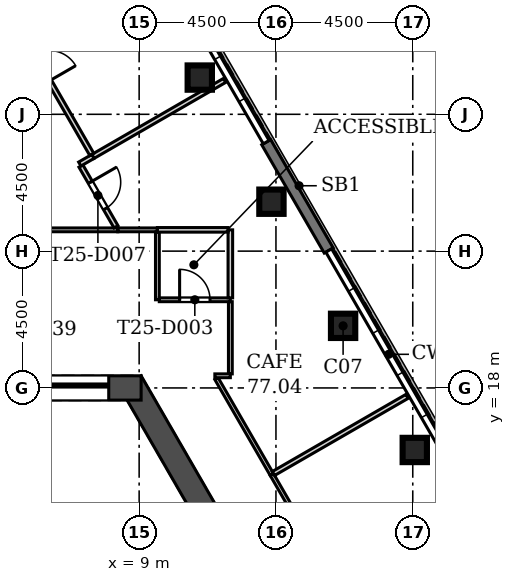
"""IFC4 building model, lengths in metres.
Left out: names, types, materials, properties, quantities, classifications, styles, units other than length and angle.
Written with IfcOpenShell. Run it as: python <this file> out.ifc"""

import sys

from ifc_helpers import new_model, si_unit, direction, frame, frame_2d, origin, origin_2d, place, context, subcontext, project, spatial, rectangle, extrude, element, fill, save


model = new_model("IFC4")
c1 = context("Model", 3, precision=1e-05, world=origin(), true_north=direction((0.0, 1.0)))
c2 = subcontext(c1, "Body", "Model", "MODEL_VIEW")
j1 = project(units=[si_unit("LENGTHUNIT", "METRE"), si_unit("PLANEANGLEUNIT", "RADIAN")], contexts=[c1])
p1 = place(None, origin())
s1 = spatial("IfcSite", under=j1, at=p1, CompositionType="ELEMENT")
p2 = place(p1, origin())
s2 = spatial("IfcBuilding", under=s1, at=p2, CompositionType="ELEMENT")
p3 = place(p2, frame((0.0, 0.0, 339.3)))
s3 = spatial("IfcBuildingStorey", under=s2, at=p3, CompositionType="ELEMENT", Elevation=339.3)
for number, where, z_axis, x_axis in (
    (1, (18.066, 15.96, 0.0), (0.0, 0.0, 1.0), (1.0, 0.0, 0.0)),
    (2, (15.709, 20.042, 0.0), (0.0, 0.0, 1.0), (1.0, 0.0, 0.0)),
    (3, (13.352, 24.125, 0.0), (0.0, 0.0, 1.0), (1.0, 0.0, 0.0)),
    (4, (10.994, 28.208, 0.0), (0.0, 0.0, 1.0), (1.0, 0.0, 0.0)),
):
    element("IfcColumn", number, at=place(p3, frame(where, z_axis=z_axis, x_axis=x_axis)), inside=s3, PredefinedType="COLUMN", context=c2, shape_type="SweptSolid", body=[
        extrude(rectangle(XDim=0.8, YDim=0.8, at=origin_2d()), origin(), (0.0, 0.0, 1.0), 5.4),
    ])
p4 = place(p3, frame((13.054, 10.692, 0.0), z_axis=(0.0, 0.0, 1.0), x_axis=(-0.500015780397, 0.866016292776, 0.0)))
e5 = element("IfcWall", 5, at=p4, inside=s3, PredefinedType="SHEAR", context=c2, shape_type="SweptSolid", body=[
    extrude(rectangle(XDim=8.67, YDim=0.8, at=frame_2d((4.335, 0.0))), origin(), (0.0, 0.0, 1.0), 5.4),
])
p5 = place(p3, frame((9.065, 18.0, 0.0), z_axis=(0.0, 0.0, 1.0), x_axis=(-1.0, 0.0, 0.0)))
e6 = element("IfcWall", 6, at=p5, inside=s3, PredefinedType="SHEAR", context=c2, shape_type="SweptSolid", body=[
    extrude(rectangle(XDim=18.13, YDim=0.8, at=frame_2d((9.065, 0.0))), origin(), (0.0, 0.0, 1.0), 5.4),
])
p6 = place(p5, frame((8.365, 0.0, 0.0)))
e7 = element("IfcOpeningElement", 7, at=p6, cuts=e6, PredefinedType="OPENING", context=c2, shape_type="SweptSolid", body=[
    extrude(rectangle(XDim=1.4, YDim=2.1, at=frame_2d((0.7, 1.05))), frame((0.0, 0.41, 0.0), z_axis=(0.0, -1.0, 0.0), x_axis=(1.0, 0.0, 0.0)), (0.0, 0.0, 1.0), 0.82),
])
p7 = place(p5, frame((11.065, 0.0, 0.0)))
e8 = element("IfcOpeningElement", 8, at=p7, cuts=e6, PredefinedType="OPENING", context=c2, shape_type="SweptSolid", body=[
    extrude(rectangle(XDim=6.0, YDim=2.4, at=frame_2d((3.0, 1.2))), frame((0.0, 0.41, 0.0), z_axis=(0.0, -1.0, 0.0), x_axis=(1.0, 0.0, 0.0)), (0.0, 0.0, 1.0), 0.82),
])
p8 = place(p5, frame((1.065, 0.0, 0.0)))
e9 = element("IfcOpeningElement", 9, at=p8, cuts=e6, PredefinedType="OPENING", context=c2, shape_type="SweptSolid", body=[
    extrude(rectangle(XDim=6.0, YDim=2.4, at=frame_2d((3.0, 1.2))), frame((0.0, 0.41, 0.0), z_axis=(0.0, -1.0, 0.0), x_axis=(1.0, 0.0, 0.0)), (0.0, 0.0, 1.0), 0.82),
])
p9 = place(p3, frame((15.237, 22.521, 0.0), z_axis=(0.0, 0.0, 1.0), x_axis=(-0.500018604663, 0.866014662111, 0.0)))
e10 = element("IfcWall", 10, at=p9, inside=s3, PredefinedType="SOLIDWALL", context=c2, shape_type="SweptSolid", body=[
    extrude(rectangle(XDim=4.115, YDim=0.34, at=frame_2d((2.058, 0.0))), origin(), (0.0, 0.0, 1.0), 4.6),
])
p10 = place(p3, frame((11.544, 18.306, 0.0), z_axis=(0.0, 0.0, 1.0), x_axis=(0.500007048974, -0.866021334019, 0.0)))
e11 = element("IfcWall", 11, at=p10, inside=s3, PredefinedType="PARTITIONING", context=c2, shape_type="SweptSolid", body=[
    extrude(rectangle(XDim=3.639, YDim=0.125, at=frame_2d((1.819, 0.0))), origin(), (0.0, 0.0, 1.0), 4.6),
])
p11 = place(p3, frame((13.364, 15.155, 0.0), z_axis=(0.0, 0.0, 1.0), x_axis=(0.499974900732, -0.866039894369, 0.0)))
e12 = element("IfcWall", 12, at=p11, inside=s3, PredefinedType="PARTITIONING", context=c2, shape_type="SweptSolid", body=[
    extrude(rectangle(XDim=4.381, YDim=0.125, at=frame_2d((2.19, 0.0))), origin(), (0.0, 0.0, 1.0), 4.6),
])
p12 = place(p3, frame((8.297, 23.2, 0.0), z_axis=(0.0, 0.0, 1.0), x_axis=(1.0, 0.0, 0.0)))
e13 = element("IfcWall", 13, at=p12, inside=s3, PredefinedType="PARTITIONING", context=c2, shape_type="SweptSolid", body=[
    extrude(rectangle(XDim=1.303, YDim=0.125, at=frame_2d((0.651, 0.0))), origin(), (0.0, 0.0, 1.0), 4.6),
])
p13 = place(p3, frame((12.0, 20.837, 0.0), z_axis=(0.0, 0.0, 1.0), x_axis=(0.0, -1.0, 0.0)))
e14 = element("IfcWall", 14, at=p13, inside=s3, PredefinedType="PARTITIONING", context=c2, shape_type="SweptSolid", body=[
    extrude(rectangle(XDim=2.375, YDim=0.125, at=frame_2d((1.187, 0.0))), origin(), (0.0, 0.0, 1.0), 4.6),
])
p14 = place(p3, frame((12.0, 18.4, 0.0), z_axis=(0.0, 0.0, 1.0), x_axis=(-1.0, 0.0, 0.0)))
e15 = element("IfcWall", 15, at=p14, inside=s3, PredefinedType="PARTITIONING", context=c2, shape_type="SweptSolid", body=[
    extrude(rectangle(XDim=0.51, YDim=0.125, at=frame_2d((0.255, 0.0))), origin(), (0.0, 0.0, 1.0), 4.6),
])
p15 = place(p3, frame((9.6, 23.125, 0.0), z_axis=(0.0, 0.0, 1.0), x_axis=(0.0, -1.0, 0.0)))
e16 = element("IfcWall", 16, at=p15, inside=s3, PredefinedType="PARTITIONING", context=c2, shape_type="SweptSolid", body=[
    extrude(rectangle(XDim=2.225, YDim=0.125, at=frame_2d((1.113, 0.0))), origin(), (0.0, 0.0, 1.0), 4.6),
])
p16 = place(p3, frame((9.663, 20.9, 0.0), z_axis=(0.0, 0.0, 1.0), x_axis=(1.0, 0.0, 0.0)))
e17 = element("IfcWall", 17, at=p16, inside=s3, PredefinedType="PARTITIONING", context=c2, shape_type="SweptSolid", body=[
    extrude(rectangle(XDim=2.337, YDim=0.125, at=frame_2d((1.169, 0.0))), origin(), (0.0, 0.0, 1.0), 4.6),
])
p17 = place(p16, frame((0.669, 0.0, 0.0)))
e18 = element("IfcOpeningElement", 18, at=p17, cuts=e17, PredefinedType="OPENING", context=c2, shape_type="SweptSolid", body=[
    extrude(rectangle(XDim=1.0, YDim=2.1, at=frame_2d((0.5, 1.05))), frame((0.0, 0.073, 0.0), z_axis=(0.0, -1.0, 0.0), x_axis=(1.0, 0.0, 0.0)), (0.0, 0.0, 1.0), 0.145),
])
p18 = place(p3, frame((-8.297, 23.2, 0.0), z_axis=(0.0, 0.0, 1.0), x_axis=(1.0, 0.0, 0.0)))
e19 = element("IfcWall", 19, at=p18, inside=s3, PredefinedType="PARTITIONING", context=c2, shape_type="SweptSolid", body=[
    extrude(rectangle(XDim=16.594, YDim=0.125, at=frame_2d((8.297, 0.0))), origin(), (0.0, 0.0, 1.0), 4.6),
])
p19 = place(p18, frame((4.798, 0.0, 0.0)))
e20 = element("IfcOpeningElement", 20, at=p19, cuts=e19, PredefinedType="OPENING", context=c2, shape_type="SweptSolid", body=[
    extrude(rectangle(XDim=1.8, YDim=2.1, at=frame_2d((0.9, 1.05))), frame((0.0, 0.073, 0.0), z_axis=(0.0, -1.0, 0.0), x_axis=(1.0, 0.0, 0.0)), (0.0, 0.0, 1.0), 0.145),
])
p20 = place(p18, frame((7.397, 0.0, 0.0)))
e21 = element("IfcOpeningElement", 21, at=p20, cuts=e19, PredefinedType="OPENING", context=c2, shape_type="SweptSolid", body=[
    extrude(rectangle(XDim=1.8, YDim=2.1, at=frame_2d((0.9, 1.05))), frame((0.0, 0.073, 0.0), z_axis=(0.0, -1.0, 0.0), x_axis=(1.0, 0.0, 0.0)), (0.0, 0.0, 1.0), 0.145),
])
p21 = place(p3, frame((12.0, 20.963, 0.0), z_axis=(0.0, 0.0, 1.0), x_axis=(0.0, 1.0, 0.0)))
e22 = element("IfcWall", 22, at=p21, inside=s3, PredefinedType="PARTITIONING", context=c2, shape_type="SweptSolid", body=[
    extrude(rectangle(XDim=2.237, YDim=0.15, at=frame_2d((1.119, 0.0))), origin(), (0.0, 0.0, 1.0), 4.6),
])
p22 = place(p3, frame((11.925, 23.2, 0.0), z_axis=(0.0, 0.0, 1.0), x_axis=(-1.0, 0.0, 0.0)))
e23 = element("IfcWall", 23, at=p22, inside=s3, PredefinedType="PARTITIONING", context=c2, shape_type="SweptSolid", body=[
    extrude(rectangle(XDim=2.325, YDim=0.15, at=frame_2d((1.163, 0.0))), origin(), (0.0, 0.0, 1.0), 4.6),
])
p23 = place(p3, frame((7.48, 25.615, 0.0), z_axis=(0.0, 0.0, 1.0), x_axis=(0.866046596414, 0.499963291492, 0.0)))
e24 = element("IfcWall", 24, at=p23, inside=s3, PredefinedType="PARTITIONING", context=c2, shape_type="SweptSolid", body=[
    extrude(rectangle(XDim=4.387, YDim=0.15, at=frame_2d((2.194, 0.0))), origin(), (0.0, 0.0, 1.0), 4.6),
])
p24 = place(p3, frame((11.394, 27.874, 0.0), z_axis=(0.0, 0.0, 1.0), x_axis=(0.865889515344, 0.500235291855, 0.0)))
e25 = element("IfcWall", 25, at=p24, inside=s3, PredefinedType="PARTITIONING", context=c2, shape_type="SweptSolid", body=[
    extrude(rectangle(XDim=0.481, YDim=0.15, at=frame_2d((0.24, 0.0))), origin(), (0.0, 0.0, 1.0), 4.6),
])
p25 = place(p3, frame((8.239, 23.3, 0.0), z_axis=(0.0, 0.0, 1.0), x_axis=(-0.499972710878, 0.866041158593, 0.0)))
e26 = element("IfcWall", 26, at=p25, inside=s3, PredefinedType="PARTITIONING", context=c2, shape_type="SweptSolid", body=[
    extrude(rectangle(XDim=2.308, YDim=0.15, at=frame_2d((1.154, 0.0))), origin(), (0.0, 0.0, 1.0), 4.6),
])
p26 = place(p25, frame((0.691, 0.0, 0.0)))
e27 = element("IfcOpeningElement", 27, at=p26, cuts=e26, PredefinedType="OPENING", context=c2, shape_type="SweptSolid", body=[
    extrude(rectangle(XDim=1.0, YDim=2.1, at=frame_2d((0.5, 1.05))), frame((0.0, 0.085, 0.0), z_axis=(0.0, -1.0, 0.0), x_axis=(1.0, 0.0, 0.0)), (0.0, 0.0, 1.0), 0.17),
])
p27 = place(p3, frame((7.047, 25.365, 0.0), z_axis=(0.0, 0.0, 1.0), x_axis=(0.866071776036, 0.499919672301, 0.0)))
e28 = element("IfcWall", 28, at=p27, inside=s3, PredefinedType="PARTITIONING", context=c2, shape_type="SweptSolid", body=[
    extrude(rectangle(XDim=0.5, YDim=0.15, at=frame_2d((0.25, 0.0))), origin(), (0.0, 0.0, 1.0), 4.6),
])
p28 = place(p3, frame((17.811, 17.722, 0.0), z_axis=(0.0, 0.0, 1.0), x_axis=(-0.86601005171, -0.50002658963, 0.0)))
e29 = element("IfcWall", 29, at=p28, inside=s3, PredefinedType="PARTITIONING", context=c2, shape_type="SweptSolid", body=[
    extrude(rectangle(XDim=5.073, YDim=0.15, at=frame_2d((2.536, 0.0))), origin(), (0.0, 0.0, 1.0), 4.6),
])
p29 = place(p3, frame((7.443, 25.679, 0.0), z_axis=(0.0, 0.0, 1.0), x_axis=(-0.500014467694, 0.866017050696, 0.0)))
e30 = element("IfcWall", 30, at=p29, inside=s3, PredefinedType="PARTITIONING", context=c2, shape_type="SweptSolid", body=[
    extrude(rectangle(XDim=6.586, YDim=0.15, at=frame_2d((3.293, 0.0))), origin(), (0.0, 0.0, 1.0), 4.6),
])
p30 = place(p29, frame((2.793, 0.0, 0.0)))
e31 = element("IfcOpeningElement", 31, at=p30, cuts=e30, PredefinedType="OPENING", context=c2, shape_type="SweptSolid", body=[
    extrude(rectangle(XDim=1.0, YDim=2.1, at=frame_2d((0.5, 1.05))), frame((0.0, 0.085, 0.0), z_axis=(0.0, -1.0, 0.0), x_axis=(1.0, 0.0, 0.0)), (0.0, 0.0, 1.0), 0.17),
])
p31 = place(p8, origin())
e32 = element("IfcDoor", 32, at=p31, inside=s3, OperationType="DOUBLE_DOOR_SLIDING", PredefinedType="DOOR", context=c2, shape_type="SweptSolid", body=[
    extrude(rectangle(XDim=6.0, YDim=2.4, at=frame_2d((3.0, 1.2))), frame((0.0, 0.025, 0.0), z_axis=(0.0, -1.0, 0.0), x_axis=(1.0, 0.0, 0.0)), (0.0, 0.0, 1.0), 0.05),
])
fill(e9, e32)
p32 = place(p17, origin())
e33 = element("IfcDoor", 33, at=p32, inside=s3, OperationType="SINGLE_SWING_LEFT", PredefinedType="DOOR", context=c2, shape_type="SweptSolid", body=[
    extrude(rectangle(XDim=1.0, YDim=2.1, at=frame_2d((0.5, 1.05))), frame((0.0, 0.025, 0.0), z_axis=(0.0, -1.0, 0.0), x_axis=(1.0, 0.0, 0.0)), (0.0, 0.0, 1.0), 0.05),
])
fill(e18, e33)
p33 = place(p26, frame((1.0, 0.0, 0.0), z_axis=(0.0, 0.0, 1.0), x_axis=(-1.0, 0.0, 0.0)))
e34 = element("IfcDoor", 34, at=p33, inside=s3, OperationType="SINGLE_SWING_LEFT", PredefinedType="DOOR", context=c2, shape_type="SweptSolid", body=[
    extrude(rectangle(XDim=1.0, YDim=2.1, at=frame_2d((0.5, 1.05))), frame((0.0, 0.025, 0.0), z_axis=(0.0, -1.0, 0.0), x_axis=(1.0, 0.0, 0.0)), (0.0, 0.0, 1.0), 0.05),
])
fill(e27, e34)
save(model, sys.argv[1])
